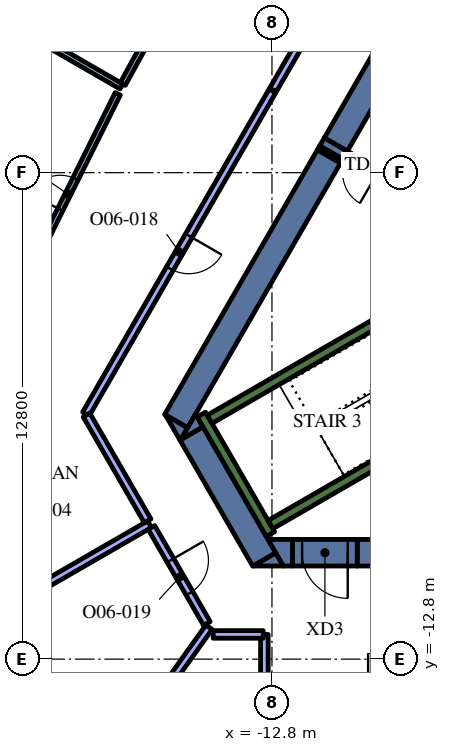
"""IFC4 building model, lengths in metres.
Left out: names, types, materials, properties, quantities, classifications, styles, units other than length and angle.
Written with IfcOpenShell. Run it as: python <this file> out.ifc"""

import sys

from ifc_helpers import new_model, si_unit, direction, frame, frame_2d, origin, place, context, subcontext, project, spatial, polyline, rectangle, outline, extrude, element, fill, save


model = new_model("IFC4")
c1 = context("Model", 3, precision=1e-05, world=origin(), true_north=direction((0.0, 1.0)))
c2 = subcontext(c1, "Body", "Model", "MODEL_VIEW")
j1 = project(units=[si_unit("LENGTHUNIT", "METRE"), si_unit("PLANEANGLEUNIT", "RADIAN")], contexts=[c1])
p1 = place(None, origin())
s1 = spatial("IfcSite", under=j1, at=p1, CompositionType="ELEMENT")
p2 = place(p1, origin())
s2 = spatial("IfcBuilding", under=s1, at=p2, CompositionType="ELEMENT")
p3 = place(p2, frame((0.0, 0.0, 205.8)))
s3 = spatial("IfcBuildingStorey", under=s2, at=p3, CompositionType="ELEMENT", Elevation=205.8)
p4 = place(p3, frame((-11.301, 0.426, 0.0), z_axis=(0.0, 0.0, 1.0), x_axis=(0.50111559984, 0.865380353138, 0.0)))
e1 = element("IfcWall", 1, at=p4, inside=s3, PredefinedType="SOLIDWALL", context=c2, shape_type="SweptSolid", body=[
    extrude(rectangle(XDim=0.121, YDim=0.7, at=frame_2d((0.061, 0.0))), origin(), (0.0, 0.0, 1.0), 4.2),
])
p5 = place(p3, frame((-15.321, -6.537, 0.0), z_axis=(0.0, 0.0, 1.0), x_axis=(0.500000268222, 0.866025248926, 0.0)))
e2 = element("IfcWall", 2, at=p5, inside=s3, PredefinedType="SOLIDWALL", context=c2, shape_type="SweptSolid", body=[
    extrude(rectangle(XDim=8.038, YDim=0.7, at=frame_2d((4.019, 0.0))), origin(), (0.0, 0.0, 1.0), 4.2),
])
p6 = place(p3, origin())
e3 = element("IfcWall", 3, at=p6, inside=s3, PredefinedType="SOLIDWALL", context=c2, shape_type="SweptSolid", body=[
    extrude(outline(polyline([(-15.213, -7.05), (-15.601, -6.378), (-15.019, -6.714), (-15.213, -7.05)])), origin(), (0.0, 0.0, 1.0), 4.2),
])
p7 = place(p3, frame((-4.696, 11.867, 0.0), z_axis=(0.0, 0.0, 1.0), x_axis=(-0.500003726532, -0.866023252259, 0.0)))
e4 = element("IfcWall", 4, at=p7, inside=s3, PredefinedType="SOLIDWALL", context=c2, shape_type="SweptSolid", body=[
    extrude(rectangle(XDim=12.848, YDim=0.7, at=frame_2d((6.424, 0.0))), origin(), (0.0, 0.0, 1.0), 4.2),
])
e5 = element("IfcWall", 5, at=p6, inside=s3, PredefinedType="SOLIDWALL", context=c2, shape_type="SweptSolid", body=[
    extrude(outline(polyline([(-11.543, 0.708), (-11.424, 0.914), (-10.843, 0.578), (-10.962, 0.372), (-11.543, 0.708)])), origin(), (0.0, 0.0, 1.0), 4.2),
])
p8 = place(p3, frame((-14.917, -6.863, 0.0), z_axis=(0.0, 0.0, 1.0), x_axis=(0.499972675833, -0.866041178825, 0.0)))
e6 = element("IfcWall", 6, at=p8, inside=s3, PredefinedType="SOLIDWALL", context=c2, shape_type="SweptSolid", body=[
    extrude(rectangle(XDim=3.829, YDim=0.7, at=frame_2d((1.915, 0.0))), origin(), (0.0, 0.0, 1.0), 4.2),
])
e7 = element("IfcWall", 7, at=p6, inside=s3, PredefinedType="SOLIDWALL", context=c2, shape_type="SweptSolid", body=[
    extrude(outline(polyline([(-14.809, -6.35), (-14.615, -6.686), (-15.197, -7.022), (-14.809, -6.35)])), origin(), (0.0, 0.0, 1.0), 4.2),
])
e8 = element("IfcWall", 8, at=p6, inside=s3, PredefinedType="SOLIDWALL", context=c2, shape_type="SweptSolid", body=[
    extrude(outline(polyline([(-12.5, -10.35), (-13.296, -10.35), (-12.698, -10.005), (-12.5, -10.35)])), origin(), (0.0, 0.0, 1.0), 4.2),
])
e9 = element("IfcWall", 9, at=p6, inside=s3, PredefinedType="SOLIDWALL", context=c2, shape_type="SweptSolid", body=[
    extrude(outline(polyline([(-12.257, -10.35), (-12.5, -10.35), (-12.904, -9.65), (-12.257, -9.65), (-12.257, -10.35)])), origin(), (0.0, 0.0, 1.0), 4.2),
])
p9 = place(p3, frame((-10.556, -10.0, 0.0), z_axis=(0.0, 0.0, 1.0), x_axis=(1.0, 0.0, 0.0)))
e10 = element("IfcWall", 10, at=p9, inside=s3, PredefinedType="SOLIDWALL", context=c2, shape_type="SweptSolid", body=[
    extrude(rectangle(XDim=19.461, YDim=0.7, at=frame_2d((9.73, 0.0))), origin(), (0.0, 0.0, 1.0), 4.2),
])
p10 = place(p3, frame((-12.84, -9.511, 0.0), z_axis=(0.0, 0.0, 1.0), x_axis=(-0.500048121057, 0.865997619297, 0.0)))
e11 = element("IfcWall", 11, at=p10, inside=s3, PredefinedType="SOLIDWALL", context=c2, shape_type="SweptSolid", body=[
    extrude(rectangle(XDim=3.634, YDim=0.25, at=frame_2d((1.817, 0.0))), origin(), (0.0, 0.0, 1.0), 4.2),
])
p11 = place(p3, frame((-14.44, -6.49, 0.0), z_axis=(0.0, 0.0, 1.0), x_axis=(0.866022966069, 0.500004222222, 0.0)))
e12 = element("IfcWall", 12, at=p11, inside=s3, PredefinedType="SOLIDWALL", context=c2, shape_type="SweptSolid", body=[
    extrude(rectangle(XDim=6.8, YDim=0.25, at=frame_2d((3.4, 0.0))), origin(), (0.0, 0.0, 1.0), 4.2),
])
p12 = place(p3, frame((-12.84, -9.261, 0.0), z_axis=(0.0, 0.0, 1.0), x_axis=(0.866016039709, 0.500016218704, 0.0)))
e13 = element("IfcWall", 13, at=p12, inside=s3, PredefinedType="SOLIDWALL", context=c2, shape_type="SweptSolid", body=[
    extrude(rectangle(XDim=7.05, YDim=0.25, at=frame_2d((3.525, 0.0))), origin(), (0.0, 0.0, 1.0), 4.2),
])
p13 = place(p3, frame((-10.556, -10.0, 0.0), z_axis=(0.0, 0.0, 1.0), x_axis=(-1.0, 0.0, 0.0)))
e14 = element("IfcWall", 14, at=p13, inside=s3, PredefinedType="SOLIDWALL", context=c2, shape_type="SweptSolid", body=[
    extrude(rectangle(XDim=1.7, YDim=0.7, at=frame_2d((0.85, 0.0))), origin(), (0.0, 0.0, 1.0), 4.2),
])
p14 = place(p13, frame((0.25, 0.0, 0.0)))
e15 = element("IfcOpeningElement", 15, at=p14, cuts=e14, PredefinedType="OPENING", context=c2, shape_type="SweptSolid", body=[
    extrude(rectangle(XDim=1.2, YDim=2.1, at=frame_2d((0.6, 1.05))), frame((0.0, 0.36, 0.0), z_axis=(0.0, -1.0, 0.0), x_axis=(1.0, 0.0, 0.0)), (0.0, 0.0, 1.0), 0.72),
])
p15 = place(p3, frame((-9.95, -0.075, 0.0), z_axis=(0.0, 0.0, 1.0), x_axis=(-0.865952669392, 0.500125958508, 0.0)))
e16 = element("IfcWall", 16, at=p15, inside=s3, PredefinedType="SOLIDWALL", context=c2, shape_type="SweptSolid", body=[
    extrude(rectangle(XDim=1.1, YDim=0.25, at=frame_2d((0.55, 0.0))), origin(), (0.0, 0.0, 1.0), 4.2),
])
p16 = place(p15, frame((0.1, 0.0, 0.0)))
e17 = element("IfcOpeningElement", 17, at=p16, cuts=e16, PredefinedType="OPENING", context=c2, shape_type="SweptSolid", body=[
    extrude(rectangle(XDim=0.9, YDim=2.1, at=frame_2d((0.45, 1.05))), frame((0.0, 0.135, 0.0), z_axis=(0.0, -1.0, 0.0), x_axis=(1.0, 0.0, 0.0)), (0.0, 0.0, 1.0), 0.27),
])
p17 = place(p3, frame((-18.709, -17.916, 0.0), z_axis=(0.0, 0.0, 1.0), x_axis=(0.581023578026, 0.813886725397, 0.0)))
e18 = element("IfcWall", 18, at=p17, inside=s3, PredefinedType="PARTITIONING", context=c2, shape_type="SweptSolid", body=[
    extrude(rectangle(XDim=7.318, YDim=0.2, at=frame_2d((3.659, 0.0))), origin(), (0.0, 0.0, 1.0), 3.45),
])
p18 = place(p3, frame((-13.0, -12.15, 0.0), z_axis=(0.0, 0.0, 1.0), x_axis=(0.0, -1.0, 0.0)))
e19 = element("IfcWall", 19, at=p18, inside=s3, PredefinedType="PARTITIONING", context=c2, shape_type="SweptSolid", body=[
    extrude(rectangle(XDim=1.5, YDim=0.2, at=frame_2d((0.75, 0.0))), origin(), (0.0, 0.0, 1.0), 3.45),
])
p19 = place(p3, frame((-14.347, -12.15, 0.0), z_axis=(0.0, 0.0, 1.0), x_axis=(1.0, 0.0, 0.0)))
e20 = element("IfcWall", 20, at=p19, inside=s3, PredefinedType="PARTITIONING", context=c2, shape_type="SweptSolid", body=[
    extrude(rectangle(XDim=1.317, YDim=0.2, at=frame_2d((0.659, 0.0))), origin(), (0.0, 0.0, 1.0), 3.45),
])
p20 = place(p3, frame((-16.761, 2.268, 0.0), z_axis=(0.0, 0.0, 1.0), x_axis=(-0.866022812202, 0.500004488726, 0.0)))
e21 = element("IfcWall", 21, at=p20, inside=s3, PredefinedType="PARTITIONING", context=c2, shape_type="SweptSolid", body=[
    extrude(rectangle(XDim=3.247, YDim=0.15, at=frame_2d((1.624, 0.0))), origin(), (0.0, 0.0, 1.0), 3.45),
])
p21 = place(p3, frame((-16.725, 2.333, 0.0), z_axis=(0.0, 0.0, 1.0), x_axis=(0.480955103875, 0.876745224142, 0.0)))
e22 = element("IfcWall", 22, at=p21, inside=s3, PredefinedType="PARTITIONING", context=c2, shape_type="SweptSolid", body=[
    extrude(rectangle(XDim=6.129, YDim=0.15, at=frame_2d((3.064, 0.0))), origin(), (0.0, 0.0, 1.0), 3.45),
])
p22 = place(p21, frame((2.629, 0.0, 0.0)))
e23 = element("IfcOpeningElement", 23, at=p22, cuts=e22, PredefinedType="OPENING", context=c2, shape_type="SweptSolid", body=[
    extrude(rectangle(XDim=0.9, YDim=2.1, at=frame_2d((0.45, 1.05))), frame((0.0, 0.085, 0.0), z_axis=(0.0, -1.0, 0.0), x_axis=(1.0, 0.0, 0.0)), (0.0, 0.0, 1.0), 0.17),
])
p23 = place(p3, frame((-19.467, -3.175, 0.0), z_axis=(0.0, 0.0, 1.0), x_axis=(0.445180755526, 0.895440726631, 0.0)))
e24 = element("IfcWall", 24, at=p23, inside=s3, PredefinedType="PARTITIONING", context=c2, shape_type="SweptSolid", body=[
    extrude(rectangle(XDim=5.864, YDim=0.15, at=frame_2d((2.932, 0.0))), origin(), (0.0, 0.0, 1.0), 3.45),
])
p24 = place(p23, frame((2.464, 0.0, 0.0)))
e25 = element("IfcOpeningElement", 25, at=p24, cuts=e24, PredefinedType="OPENING", context=c2, shape_type="SweptSolid", body=[
    extrude(rectangle(XDim=0.9, YDim=2.1, at=frame_2d((0.45, 1.05))), frame((0.0, 0.085, 0.0), z_axis=(0.0, -1.0, 0.0), x_axis=(1.0, 0.0, 0.0)), (0.0, 0.0, 1.0), 0.17),
])
p25 = place(p3, frame((-16.021, -9.25, 0.0), z_axis=(0.0, 0.0, 1.0), x_axis=(-0.86601739438, -0.500013872438, 0.0)))
e26 = element("IfcWall", 26, at=p25, inside=s3, PredefinedType="PARTITIONING", context=c2, shape_type="SweptSolid", body=[
    extrude(rectangle(XDim=6.478, YDim=0.2, at=frame_2d((3.239, 0.0))), origin(), (0.0, 0.0, 1.0), 3.45),
])
p26 = place(p3, frame((-8.272, 9.972, 0.0), z_axis=(0.0, 0.0, 1.0), x_axis=(-0.5000018851, -0.866024315419, 0.0)))
e27 = element("IfcWall", 27, at=p26, inside=s3, PredefinedType="PARTITIONING", context=c2, shape_type="SweptSolid", body=[
    extrude(rectangle(XDim=9.0, YDim=0.2, at=frame_2d((4.5, 0.0))), origin(), (0.0, 0.0, 1.0), 3.45),
])
p27 = place(p3, frame((-12.787, 2.152, 0.0), z_axis=(0.0, 0.0, 1.0), x_axis=(-0.50000660679, -0.866021589319, 0.0)))
e28 = element("IfcWall", 28, at=p27, inside=s3, PredefinedType="PARTITIONING", context=c2, shape_type="SweptSolid", body=[
    extrude(rectangle(XDim=9.817, YDim=0.2, at=frame_2d((4.909, 0.0))), origin(), (0.0, 0.0, 1.0), 3.45),
])
p28 = place(p27, frame((4.4, 0.0, 0.0)))
e29 = element("IfcOpeningElement", 29, at=p28, cuts=e28, PredefinedType="OPENING", context=c2, shape_type="SweptSolid", body=[
    extrude(rectangle(XDim=1.0, YDim=2.1, at=frame_2d((0.5, 1.05))), frame((0.0, 0.11, 0.0), z_axis=(0.0, -1.0, 0.0), x_axis=(1.0, 0.0, 0.0)), (0.0, 0.0, 1.0), 0.22),
])
p29 = place(p3, frame((-17.681, -6.376, 0.0), z_axis=(0.0, 0.0, 1.0), x_axis=(0.500022299258, -0.866012528919, 0.0)))
e30 = element("IfcWall", 30, at=p29, inside=s3, PredefinedType="PARTITIONING", context=c2, shape_type="SweptSolid", body=[
    extrude(rectangle(XDim=3.219, YDim=0.2, at=frame_2d((1.609, 0.0))), origin(), (0.0, 0.0, 1.0), 3.45),
])
p30 = place(p3, frame((-15.971, -9.337, 0.0), z_axis=(0.0, 0.0, 1.0), x_axis=(0.500007233661, -0.866021227388, 0.0)))
e31 = element("IfcWall", 31, at=p30, inside=s3, PredefinedType="PARTITIONING", context=c2, shape_type="SweptSolid", body=[
    extrude(rectangle(XDim=2.919, YDim=0.2, at=frame_2d((1.459, 0.0))), origin(), (0.0, 0.0, 1.0), 3.45),
])
p31 = place(p30, frame((1.0, 0.0, 0.0)))
e32 = element("IfcOpeningElement", 32, at=p31, cuts=e31, PredefinedType="OPENING", context=c2, shape_type="SweptSolid", body=[
    extrude(rectangle(XDim=1.0, YDim=2.1, at=frame_2d((0.5, 1.05))), frame((0.0, 0.11, 0.0), z_axis=(0.0, -1.0, 0.0), x_axis=(1.0, 0.0, 0.0)), (0.0, 0.0, 1.0), 0.22),
])
p32 = place(p14, origin())
e33 = element("IfcDoor", 33, at=p32, inside=s3, OperationType="SINGLE_SWING_LEFT", PredefinedType="DOOR", context=c2, shape_type="SweptSolid", body=[
    extrude(rectangle(XDim=1.2, YDim=2.1, at=frame_2d((0.6, 1.05))), frame((0.0, 0.025, 0.0), z_axis=(0.0, -1.0, 0.0), x_axis=(1.0, 0.0, 0.0)), (0.0, 0.0, 1.0), 0.05),
])
fill(e15, e33)
p33 = place(p16, origin())
e34 = element("IfcDoor", 34, at=p33, inside=s3, OperationType="SINGLE_SWING_LEFT", PredefinedType="DOOR", context=c2, shape_type="SweptSolid", body=[
    extrude(rectangle(XDim=0.9, YDim=2.1, at=frame_2d((0.45, 1.05))), frame((0.0, 0.025, 0.0), z_axis=(0.0, -1.0, 0.0), x_axis=(1.0, 0.0, 0.0)), (0.0, 0.0, 1.0), 0.05),
])
fill(e17, e34)
p34 = place(p24, origin())
e35 = element("IfcDoor", 35, at=p34, inside=s3, OperationType="SINGLE_SWING_LEFT", PredefinedType="DOOR", context=c2, shape_type="SweptSolid", body=[
    extrude(rectangle(XDim=0.9, YDim=2.1, at=frame_2d((0.45, 1.05))), frame((0.0, 0.025, 0.0), z_axis=(0.0, -1.0, 0.0), x_axis=(1.0, 0.0, 0.0)), (0.0, 0.0, 1.0), 0.05),
])
fill(e25, e35)
p35 = place(p28, origin())
e36 = element("IfcDoor", 36, at=p35, inside=s3, OperationType="SINGLE_SWING_LEFT", PredefinedType="DOOR", context=c2, shape_type="SweptSolid", body=[
    extrude(rectangle(XDim=1.0, YDim=2.1, at=frame_2d((0.5, 1.05))), frame((0.0, 0.025, 0.0), z_axis=(0.0, -1.0, 0.0), x_axis=(1.0, 0.0, 0.0)), (0.0, 0.0, 1.0), 0.05),
])
fill(e29, e36)
p36 = place(p31, origin())
e37 = element("IfcDoor", 37, at=p36, inside=s3, OperationType="SINGLE_SWING_RIGHT", PredefinedType="DOOR", context=c2, shape_type="SweptSolid", body=[
    extrude(rectangle(XDim=1.0, YDim=2.1, at=frame_2d((0.5, 1.05))), frame((0.0, 0.025, 0.0), z_axis=(0.0, -1.0, 0.0), x_axis=(1.0, 0.0, 0.0)), (0.0, 0.0, 1.0), 0.05),
])
fill(e32, e37)
save(model, sys.argv[1])
